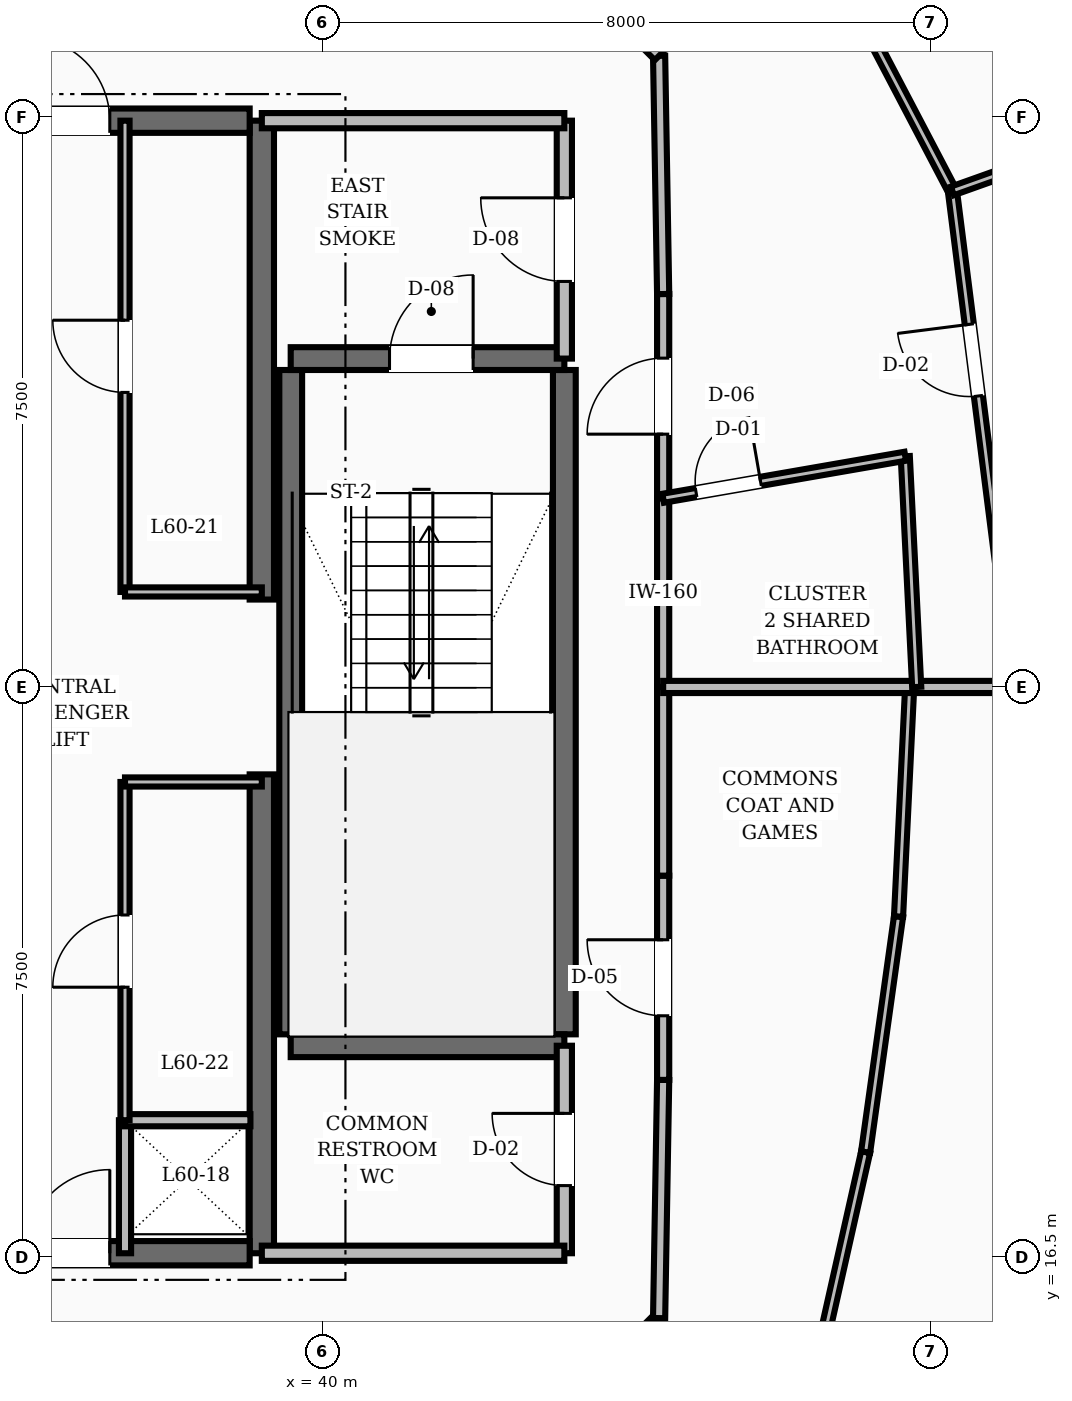
"""IFC4 building model, lengths in metres.
Left out: names, types, materials, properties, quantities, classifications, styles, units other than length and angle.
Written with IfcOpenShell. Run it as: python <this file> out.ifc"""

import sys

from ifc_helpers import new_model, si_unit, direction, frame, frame_2d, origin, place, context, subcontext, project, spatial, rectangle, extrude, element, fill, save


model = new_model("IFC4")
c1 = context("Model", 3, precision=1e-05, world=origin(), true_north=direction((0.0, 1.0)))
c2 = subcontext(c1, "Body", "Model", "MODEL_VIEW")
j1 = project(units=[si_unit("LENGTHUNIT", "METRE"), si_unit("PLANEANGLEUNIT", "RADIAN")], contexts=[c1])
p1 = place(None, origin())
s1 = spatial("IfcSite", under=j1, at=p1, CompositionType="ELEMENT")
p2 = place(p1, origin())
s2 = spatial("IfcBuilding", under=s1, at=p2, CompositionType="ELEMENT")
p3 = place(p2, frame((0.0, 0.0, 232.8)))
s3 = spatial("IfcBuildingStorey", under=s2, at=p3, CompositionType="ELEMENT", Elevation=232.8)
for number, where, z_axis, x_axis in (
    (1, (39.2, 16.55, 0.0), (0.0, 0.0, 1.0), (0.0, 1.0, 0.0)),
    (2, (39.2, 25.15, 0.0), (0.0, 0.0, 1.0), (0.0, 1.0, 0.0)),
):
    element("IfcWall", number, at=place(p3, frame(where, z_axis=z_axis, x_axis=x_axis)), inside=s3, PredefinedType="SHEAR", context=c2, shape_type="SweptSolid", body=[
        extrude(rectangle(XDim=6.3, YDim=0.32, at=frame_2d((3.15, 0.0))), origin(), (0.0, 0.0, 1.0), 3.6),
    ])
p4 = place(p3, frame((35.8, 16.55, 0.0), z_axis=(0.0, 0.0, 1.0), x_axis=(1.0, 0.0, 0.0)))
e3 = element("IfcWall", 3, at=p4, inside=s3, PredefinedType="SHEAR", context=c2, shape_type="SweptSolid", body=[
    extrude(rectangle(XDim=3.24, YDim=0.32, at=frame_2d((1.62, 0.0))), origin(), (0.0, 0.0, 1.0), 3.6),
])
p5 = place(p4, frame((0.3, 0.0, 0.0)))
e4 = element("IfcOpeningElement", 4, at=p5, cuts=e3, PredefinedType="OPENING", context=c2, shape_type="SweptSolid", body=[
    extrude(rectangle(XDim=1.1, YDim=2.1, at=frame_2d((0.55, 1.05))), frame((0.0, 0.17, 0.0), z_axis=(0.0, -1.0, 0.0), x_axis=(1.0, 0.0, 0.0)), (0.0, 0.0, 1.0), 0.34),
])
p6 = place(p3, frame((35.8, 31.45, 0.0), z_axis=(0.0, 0.0, 1.0), x_axis=(1.0, 0.0, 0.0)))
e5 = element("IfcWall", 5, at=p6, inside=s3, PredefinedType="SHEAR", context=c2, shape_type="SweptSolid", body=[
    extrude(rectangle(XDim=3.24, YDim=0.32, at=frame_2d((1.62, 0.0))), origin(), (0.0, 0.0, 1.0), 3.6),
])
p7 = place(p6, frame((0.3, 0.0, 0.0)))
e6 = element("IfcOpeningElement", 6, at=p7, cuts=e5, PredefinedType="OPENING", context=c2, shape_type="SweptSolid", body=[
    extrude(rectangle(XDim=1.1, YDim=2.1, at=frame_2d((0.55, 1.05))), frame((0.0, 0.17, 0.0), z_axis=(0.0, -1.0, 0.0), x_axis=(1.0, 0.0, 0.0)), (0.0, 0.0, 1.0), 0.34),
])
for number, where, z_axis, x_axis in (
    (7, (43.18, 19.43, 0.0), (0.0, 0.0, 1.0), (0.0, 1.0, 0.0)),
    (8, (39.58, 19.43, 0.0), (0.0, 0.0, 1.0), (0.0, 1.0, 0.0)),
):
    element("IfcWall", number, at=place(p3, frame(where, z_axis=z_axis, x_axis=x_axis)), inside=s3, PredefinedType="SHEAR", context=c2, shape_type="SweptSolid", body=[
        extrude(rectangle(XDim=8.74, YDim=0.3, at=frame_2d((4.37, 0.0))), origin(), (0.0, 0.0, 1.0), 3.6),
    ])
p8 = place(p3, frame((39.58, 19.28, 0.0), z_axis=(0.0, 0.0, 1.0), x_axis=(1.0, 0.0, 0.0)))
e9 = element("IfcWall", 9, at=p8, inside=s3, PredefinedType="SHEAR", context=c2, shape_type="SweptSolid", body=[
    extrude(rectangle(XDim=3.6, YDim=0.3, at=frame_2d((1.8, 0.0))), origin(), (0.0, 0.0, 1.0), 3.6),
])
p9 = place(p3, frame((39.58, 28.32, 0.0), z_axis=(0.0, 0.0, 1.0), x_axis=(1.0, 0.0, 0.0)))
e10 = element("IfcWall", 10, at=p9, inside=s3, PredefinedType="SHEAR", context=c2, shape_type="SweptSolid", body=[
    extrude(rectangle(XDim=3.6, YDim=0.3, at=frame_2d((1.8, 0.0))), origin(), (0.0, 0.0, 1.0), 3.6),
])
p10 = place(p9, frame((1.3, 0.0, 0.0)))
e11 = element("IfcOpeningElement", 11, at=p10, cuts=e10, PredefinedType="OPENING", context=c2, shape_type="SweptSolid", body=[
    extrude(rectangle(XDim=1.1, YDim=2.1, at=frame_2d((0.55, 1.05))), frame((0.0, 0.16, 0.0), z_axis=(0.0, -1.0, 0.0), x_axis=(1.0, 0.0, 0.0)), (0.0, 0.0, 1.0), 0.32),
])
p11 = place(p3, frame((43.18, 28.32, 0.0), z_axis=(0.0, 0.0, 1.0), x_axis=(0.0, 1.0, 0.0)))
e12 = element("IfcWall", 12, at=p11, inside=s3, PredefinedType="SOLIDWALL", context=c2, shape_type="SweptSolid", body=[
    extrude(rectangle(XDim=3.13, YDim=0.2, at=frame_2d((1.565, 0.0))), origin(), (0.0, 0.0, 1.0), 2.87),
])
p12 = place(p11, frame((1.015, 0.0, 0.0)))
e13 = element("IfcOpeningElement", 13, at=p12, cuts=e12, PredefinedType="OPENING", context=c2, shape_type="SweptSolid", body=[
    extrude(rectangle(XDim=1.1, YDim=2.1, at=frame_2d((0.55, 1.05))), frame((0.0, 0.11, 0.0), z_axis=(0.0, -1.0, 0.0), x_axis=(1.0, 0.0, 0.0)), (0.0, 0.0, 1.0), 0.22),
])
p13 = place(p3, frame((39.2, 31.45, 0.0), z_axis=(0.0, 0.0, 1.0), x_axis=(1.0, 0.0, 0.0)))
e14 = element("IfcWall", 14, at=p13, inside=s3, PredefinedType="SOLIDWALL", context=c2, shape_type="SweptSolid", body=[
    extrude(rectangle(XDim=3.98, YDim=0.2, at=frame_2d((1.99, 0.0))), origin(), (0.0, 0.0, 1.0), 2.87),
])
p14 = place(p3, frame((43.18, 16.55, 0.0), z_axis=(0.0, 0.0, 1.0), x_axis=(0.0, 1.0, 0.0)))
e15 = element("IfcWall", 15, at=p14, inside=s3, PredefinedType="SOLIDWALL", context=c2, shape_type="SweptSolid", body=[
    extrude(rectangle(XDim=2.73, YDim=0.2, at=frame_2d((1.365, 0.0))), origin(), (0.0, 0.0, 1.0), 2.87),
])
p15 = place(p14, frame((0.89, 0.0, 0.0)))
e16 = element("IfcOpeningElement", 16, at=p15, cuts=e15, PredefinedType="OPENING", context=c2, shape_type="SweptSolid", body=[
    extrude(rectangle(XDim=0.95, YDim=2.1, at=frame_2d((0.475, 1.05))), frame((0.0, 0.11, 0.0), z_axis=(0.0, -1.0, 0.0), x_axis=(1.0, 0.0, 0.0)), (0.0, 0.0, 1.0), 0.22),
])
p16 = place(p3, frame((39.2, 16.55, 0.0), z_axis=(0.0, 0.0, 1.0), x_axis=(1.0, 0.0, 0.0)))
e17 = element("IfcWall", 17, at=p16, inside=s3, PredefinedType="SOLIDWALL", context=c2, shape_type="SweptSolid", body=[
    extrude(rectangle(XDim=3.98, YDim=0.2, at=frame_2d((1.99, 0.0))), origin(), (0.0, 0.0, 1.0), 2.87),
])
p17 = place(p3, frame((37.4, 16.55, 0.0), z_axis=(0.0, 0.0, 1.0), x_axis=(0.0, 1.0, 0.0)))
e18 = element("IfcWall", 18, at=p17, inside=s3, PredefinedType="SOLIDWALL", context=c2, shape_type="SweptSolid", body=[
    extrude(rectangle(XDim=1.75, YDim=0.16, at=frame_2d((0.875, 0.0))), origin(), (0.0, 0.0, 1.0), 2.87),
])
p18 = place(p3, frame((37.4, 18.3, 0.0), z_axis=(0.0, 0.0, 1.0), x_axis=(1.0, 0.0, 0.0)))
e19 = element("IfcWall", 19, at=p18, inside=s3, PredefinedType="SOLIDWALL", context=c2, shape_type="SweptSolid", body=[
    extrude(rectangle(XDim=1.65, YDim=0.16, at=frame_2d((0.825, 0.0))), origin(), (0.0, 0.0, 1.0), 2.87),
])
p19 = place(p3, frame((37.4, 25.25, 0.0), z_axis=(0.0, 0.0, 1.0), x_axis=(0.0, 1.0, 0.0)))
e20 = element("IfcWall", 20, at=p19, inside=s3, PredefinedType="PARTITIONING", context=c2, shape_type="SweptSolid", body=[
    extrude(rectangle(XDim=6.2, YDim=0.12, at=frame_2d((3.1, 0.0))), origin(), (0.0, 0.0, 1.0), 2.87),
])
p20 = place(p19, frame((2.625, 0.0, 0.0)))
e21 = element("IfcOpeningElement", 21, at=p20, cuts=e20, PredefinedType="OPENING", context=c2, shape_type="SweptSolid", body=[
    extrude(rectangle(XDim=0.95, YDim=2.1, at=frame_2d((0.475, 1.05))), frame((0.0, 0.07, 0.0), z_axis=(0.0, -1.0, 0.0), x_axis=(1.0, 0.0, 0.0)), (0.0, 0.0, 1.0), 0.14),
])
p21 = place(p3, frame((37.4, 25.25, 0.0), z_axis=(0.0, 0.0, 1.0), x_axis=(1.0, 0.0, 0.0)))
e22 = element("IfcWall", 22, at=p21, inside=s3, PredefinedType="PARTITIONING", context=c2, shape_type="SweptSolid", body=[
    extrude(rectangle(XDim=1.8, YDim=0.12, at=frame_2d((0.9, 0.0))), origin(), (0.0, 0.0, 1.0), 2.87),
])
p22 = place(p3, frame((37.4, 18.3, 0.0), z_axis=(0.0, 0.0, 1.0), x_axis=(0.0, 1.0, 0.0)))
e23 = element("IfcWall", 23, at=p22, inside=s3, PredefinedType="PARTITIONING", context=c2, shape_type="SweptSolid", body=[
    extrude(rectangle(XDim=4.45, YDim=0.12, at=frame_2d((2.225, 0.0))), origin(), (0.0, 0.0, 1.0), 2.87),
])
p23 = place(p22, frame((1.75, 0.0, 0.0)))
e24 = element("IfcOpeningElement", 24, at=p23, cuts=e23, PredefinedType="OPENING", context=c2, shape_type="SweptSolid", body=[
    extrude(rectangle(XDim=0.95, YDim=2.1, at=frame_2d((0.475, 1.05))), frame((0.0, 0.07, 0.0), z_axis=(0.0, -1.0, 0.0), x_axis=(1.0, 0.0, 0.0)), (0.0, 0.0, 1.0), 0.14),
])
p24 = place(p3, frame((37.4, 22.75, 0.0), z_axis=(0.0, 0.0, 1.0), x_axis=(1.0, 0.0, 0.0)))
e25 = element("IfcWall", 25, at=p24, inside=s3, PredefinedType="PARTITIONING", context=c2, shape_type="SweptSolid", body=[
    extrude(rectangle(XDim=1.8, YDim=0.12, at=frame_2d((0.9, 0.0))), origin(), (0.0, 0.0, 1.0), 2.87),
])
p25 = place(p3, frame((44.48, 24.0, 0.0), z_axis=(0.0, 0.0, 1.0), x_axis=(0.0, 1.0, 0.0)))
e26 = element("IfcWall", 26, at=p25, inside=s3, PredefinedType="SOLIDWALL", context=c2, shape_type="SweptSolid", body=[
    extrude(rectangle(XDim=2.482, YDim=0.16, at=frame_2d((1.241, 0.0))), origin(), (0.0, 0.0, 1.0), 2.87),
])
p26 = place(p3, frame((44.48, 26.482, 0.0), z_axis=(0.0, 0.0, 1.0), x_axis=(0.0, 1.0, 0.0)))
e27 = element("IfcWall", 27, at=p26, inside=s3, PredefinedType="SOLIDWALL", context=c2, shape_type="SweptSolid", body=[
    extrude(rectangle(XDim=2.687, YDim=0.16, at=frame_2d((1.344, 0.0))), origin(), (0.0, 0.0, 1.0), 2.87),
])
p27 = place(p26, frame((0.844, 0.0, 0.0)))
e28 = element("IfcOpeningElement", 28, at=p27, cuts=e27, PredefinedType="OPENING", context=c2, shape_type="SweptSolid", body=[
    extrude(rectangle(XDim=1.0, YDim=2.1, at=frame_2d((0.5, 1.05))), frame((0.0, 0.09, 0.0), z_axis=(0.0, -1.0, 0.0), x_axis=(1.0, 0.0, 0.0)), (0.0, 0.0, 1.0), 0.18),
])
p28 = place(p3, frame((44.48, 29.169, 0.0), z_axis=(0.0, 0.0, 1.0), x_axis=(-0.016981035134, 0.999855811828, 0.0)))
e29 = element("IfcWall", 29, at=p28, inside=s3, PredefinedType="SOLIDWALL", context=c2, shape_type="SweptSolid", body=[
    extrude(rectangle(XDim=3.134, YDim=0.16, at=frame_2d((1.567, 0.0))), origin(), (0.0, 0.0, 1.0), 2.87),
])
for number, where, z_axis, x_axis in (
    (30, (44.427, 32.303, 0.0), (0.0, 0.0, 1.0), (-0.707, 0.707, 0.0)),
    (31, (42.365, 13.635, 0.0), (0.0, 0.0, 1.0), (0.707, 0.707, 0.0)),
):
    element("IfcWall", number, at=place(p3, frame(where, z_axis=z_axis, x_axis=x_axis)), inside=s3, PredefinedType="SOLIDWALL", context=c2, shape_type="SweptSolid", body=[
        extrude(rectangle(XDim=2.916, YDim=0.16, at=frame_2d((1.458, 0.0))), origin(), (0.0, 0.0, 1.0), 2.87),
    ])
p29 = place(p3, frame((44.427, 15.697, 0.0), z_axis=(0.0, 0.0, 1.0), x_axis=(0.016981035134, 0.999855811828, 0.0)))
e32 = element("IfcWall", 32, at=p29, inside=s3, PredefinedType="SOLIDWALL", context=c2, shape_type="SweptSolid", body=[
    extrude(rectangle(XDim=3.134, YDim=0.16, at=frame_2d((1.567, 0.0))), origin(), (0.0, 0.0, 1.0), 2.87),
])
p30 = place(p3, frame((44.48, 18.831, 0.0), z_axis=(0.0, 0.0, 1.0), x_axis=(0.0, 1.0, 0.0)))
e33 = element("IfcWall", 33, at=p30, inside=s3, PredefinedType="SOLIDWALL", context=c2, shape_type="SweptSolid", body=[
    extrude(rectangle(XDim=2.687, YDim=0.16, at=frame_2d((1.344, 0.0))), origin(), (0.0, 0.0, 1.0), 2.87),
])
p31 = place(p30, frame((0.844, 0.0, 0.0)))
e34 = element("IfcOpeningElement", 34, at=p31, cuts=e33, PredefinedType="OPENING", context=c2, shape_type="SweptSolid", body=[
    extrude(rectangle(XDim=1.0, YDim=2.1, at=frame_2d((0.5, 1.05))), frame((0.0, 0.09, 0.0), z_axis=(0.0, -1.0, 0.0), x_axis=(1.0, 0.0, 0.0)), (0.0, 0.0, 1.0), 0.18),
])
p32 = place(p3, frame((44.48, 21.518, 0.0), z_axis=(0.0, 0.0, 1.0), x_axis=(0.0, 1.0, 0.0)))
e35 = element("IfcWall", 35, at=p32, inside=s3, PredefinedType="SOLIDWALL", context=c2, shape_type="SweptSolid", body=[
    extrude(rectangle(XDim=2.482, YDim=0.16, at=frame_2d((1.241, 0.0))), origin(), (0.0, 0.0, 1.0), 2.87),
])
p33 = place(p3, frame((46.406, 14.598, 0.0), z_axis=(0.0, 0.0, 1.0), x_axis=(0.219303315939, 0.975656730422, 0.0)))
e36 = element("IfcWall", 36, at=p33, inside=s3, PredefinedType="PARTITIONING", context=c2, shape_type="SweptSolid", body=[
    extrude(rectangle(XDim=3.365, YDim=0.12, at=frame_2d((1.683, 0.0))), origin(), (0.0, 0.0, 1.0), 2.87),
])
p34 = place(p3, frame((47.144, 17.881, 0.0), z_axis=(0.0, 0.0, 1.0), x_axis=(0.138416734292, 0.990374074614, 0.0)))
e37 = element("IfcWall", 37, at=p34, inside=s3, PredefinedType="PARTITIONING", context=c2, shape_type="SweptSolid", body=[
    extrude(rectangle(XDim=3.129, YDim=0.12, at=frame_2d((1.564, 0.0))), origin(), (0.0, 0.0, 1.0), 2.87),
])
p35 = place(p3, frame((47.577, 20.98, 0.0), z_axis=(0.0, 0.0, 1.0), x_axis=(0.048366932207, 0.998829635057, 0.0)))
e38 = element("IfcWall", 38, at=p35, inside=s3, PredefinedType="PARTITIONING", context=c2, shape_type="SweptSolid", body=[
    extrude(rectangle(XDim=3.023, YDim=0.12, at=frame_2d((1.512, 0.0))), origin(), (0.0, 0.0, 1.0), 2.87),
])
p36 = place(p3, frame((44.48, 24.0, 0.0), z_axis=(0.0, 0.0, 1.0), x_axis=(1.0, 0.0, 0.0)))
e39 = element("IfcWall", 39, at=p36, inside=s3, PredefinedType="SOLIDWALL", context=c2, shape_type="SweptSolid", body=[
    extrude(rectangle(XDim=9.216, YDim=0.16, at=frame_2d((4.608, 0.0))), origin(), (0.0, 0.0, 1.0), 2.87),
])
p37 = place(p3, frame((47.816, 24.0, 0.0), z_axis=(0.0, 0.0, 1.0), x_axis=(-0.049484864646, 0.998774873618, 0.0)))
e40 = element("IfcWall", 40, at=p37, inside=s3, PredefinedType="PARTITIONING", context=c2, shape_type="SweptSolid", body=[
    extrude(rectangle(XDim=3.039, YDim=0.12, at=frame_2d((1.52, 0.0))), origin(), (0.0, 0.0, 1.0), 2.87),
])
p38 = place(p3, frame((44.48, 26.482, 0.0), z_axis=(0.0, 0.0, 1.0), x_axis=(0.985263255419, 0.171044782212, 0.0)))
e41 = element("IfcWall", 41, at=p38, inside=s3, PredefinedType="PARTITIONING", context=c2, shape_type="SweptSolid", body=[
    extrude(rectangle(XDim=3.233, YDim=0.12, at=frame_2d((1.616, 0.0))), origin(), (0.0, 0.0, 1.0), 2.87),
])
p39 = place(p38, frame((0.44, 0.0, 0.0)))
e42 = element("IfcOpeningElement", 42, at=p39, cuts=e41, PredefinedType="OPENING", context=c2, shape_type="SweptSolid", body=[
    extrude(rectangle(XDim=0.86, YDim=2.1, at=frame_2d((0.43, 1.05))), frame((0.0, 0.07, 0.0), z_axis=(0.0, -1.0, 0.0), x_axis=(1.0, 0.0, 0.0)), (0.0, 0.0, 1.0), 0.14),
])
p40 = place(p3, frame((49.113, 24.0, 0.0), z_axis=(0.0, 0.0, 1.0), x_axis=(-0.125779473563, 0.992058226129, 0.0)))
e43 = element("IfcWall", 43, at=p40, inside=s3, PredefinedType="PARTITIONING", context=c2, shape_type="SweptSolid", body=[
    extrude(rectangle(XDim=6.578, YDim=0.12, at=frame_2d((3.289, 0.0))), origin(), (0.0, 0.0, 1.0), 2.87),
])
p41 = place(p40, frame((3.859, 0.0, 0.0)))
e44 = element("IfcOpeningElement", 44, at=p41, cuts=e43, PredefinedType="OPENING", context=c2, shape_type="SweptSolid", body=[
    extrude(rectangle(XDim=0.95, YDim=2.1, at=frame_2d((0.475, 1.05))), frame((0.0, 0.07, 0.0), z_axis=(0.0, -1.0, 0.0), x_axis=(1.0, 0.0, 0.0)), (0.0, 0.0, 1.0), 0.14),
])
p42 = place(p3, frame((48.285, 30.526, 0.0), z_axis=(0.0, 0.0, 1.0), x_axis=(-0.464213686546, 0.885723237373, 0.0)))
e45 = element("IfcWall", 45, at=p42, inside=s3, PredefinedType="PARTITIONING", context=c2, shape_type="SweptSolid", body=[
    extrude(rectangle(XDim=6.929, YDim=0.12, at=frame_2d((3.464, 0.0))), origin(), (0.0, 0.0, 1.0), 2.87),
])
p43 = place(p42, frame((2.99, 0.0, 0.0)))
e46 = element("IfcOpeningElement", 46, at=p43, cuts=e45, PredefinedType="OPENING", context=c2, shape_type="SweptSolid", body=[
    extrude(rectangle(XDim=0.95, YDim=2.1, at=frame_2d((0.475, 1.05))), frame((0.0, 0.07, 0.0), z_axis=(0.0, -1.0, 0.0), x_axis=(1.0, 0.0, 0.0)), (0.0, 0.0, 1.0), 0.14),
])
p44 = place(p3, frame((48.285, 30.526, 0.0), z_axis=(0.0, 0.0, 1.0), x_axis=(0.941925899745, 0.335820784629, 0.0)))
e47 = element("IfcWall", 47, at=p44, inside=s3, PredefinedType="PARTITIONING", context=c2, shape_type="SweptSolid", body=[
    extrude(rectangle(XDim=3.99, YDim=0.12, at=frame_2d((1.995, 0.0))), origin(), (0.0, 0.0, 1.0), 2.87),
])
p45 = place(p10, origin())
e48 = element("IfcDoor", 48, at=p45, inside=s3, OperationType="SINGLE_SWING_RIGHT", PredefinedType="DOOR", context=c2, shape_type="SweptSolid", body=[
    extrude(rectangle(XDim=1.1, YDim=2.1, at=frame_2d((0.55, 1.05))), frame((0.0, 0.025, 0.0), z_axis=(0.0, -1.0, 0.0), x_axis=(1.0, 0.0, 0.0)), (0.0, 0.0, 1.0), 0.05),
])
fill(e11, e48)
p46 = place(p12, origin())
e49 = element("IfcDoor", 49, at=p46, inside=s3, OperationType="SINGLE_SWING_RIGHT", PredefinedType="DOOR", context=c2, shape_type="SweptSolid", body=[
    extrude(rectangle(XDim=1.1, YDim=2.1, at=frame_2d((0.55, 1.05))), frame((0.0, 0.025, 0.0), z_axis=(0.0, -1.0, 0.0), x_axis=(1.0, 0.0, 0.0)), (0.0, 0.0, 1.0), 0.05),
])
fill(e13, e49)
p47 = place(p15, origin())
e50 = element("IfcDoor", 50, at=p47, inside=s3, OperationType="SINGLE_SWING_RIGHT", PredefinedType="DOOR", context=c2, shape_type="SweptSolid", body=[
    extrude(rectangle(XDim=0.95, YDim=2.1, at=frame_2d((0.475, 1.05))), frame((0.0, 0.025, 0.0), z_axis=(0.0, -1.0, 0.0), x_axis=(1.0, 0.0, 0.0)), (0.0, 0.0, 1.0), 0.05),
])
fill(e16, e50)
p48 = place(p7, origin())
e51 = element("IfcDoor", 51, at=p48, inside=s3, OperationType="SINGLE_SWING_LEFT", PredefinedType="DOOR", context=c2, shape_type="SweptSolid", body=[
    extrude(rectangle(XDim=1.1, YDim=2.1, at=frame_2d((0.55, 1.05))), frame((0.0, 0.025, 0.0), z_axis=(0.0, -1.0, 0.0), x_axis=(1.0, 0.0, 0.0)), (0.0, 0.0, 1.0), 0.05),
])
fill(e6, e51)
p49 = place(p5, origin())
e52 = element("IfcDoor", 52, at=p49, inside=s3, OperationType="SINGLE_SWING_RIGHT", PredefinedType="DOOR", context=c2, shape_type="SweptSolid", body=[
    extrude(rectangle(XDim=1.1, YDim=2.1, at=frame_2d((0.55, 1.05))), frame((0.0, 0.025, 0.0), z_axis=(0.0, -1.0, 0.0), x_axis=(1.0, 0.0, 0.0)), (0.0, 0.0, 1.0), 0.05),
])
fill(e4, e52)
p50 = place(p20, origin())
e53 = element("IfcDoor", 53, at=p50, inside=s3, OperationType="SINGLE_SWING_RIGHT", PredefinedType="DOOR", context=c2, shape_type="SweptSolid", body=[
    extrude(rectangle(XDim=0.95, YDim=2.1, at=frame_2d((0.475, 1.05))), frame((0.0, 0.025, 0.0), z_axis=(0.0, -1.0, 0.0), x_axis=(1.0, 0.0, 0.0)), (0.0, 0.0, 1.0), 0.05),
])
fill(e21, e53)
p51 = place(p23, origin())
e54 = element("IfcDoor", 54, at=p51, inside=s3, OperationType="SINGLE_SWING_LEFT", PredefinedType="DOOR", context=c2, shape_type="SweptSolid", body=[
    extrude(rectangle(XDim=0.95, YDim=2.1, at=frame_2d((0.475, 1.05))), frame((0.0, 0.025, 0.0), z_axis=(0.0, -1.0, 0.0), x_axis=(1.0, 0.0, 0.0)), (0.0, 0.0, 1.0), 0.05),
])
fill(e24, e54)
p52 = place(p31, origin())
e55 = element("IfcDoor", 55, at=p52, inside=s3, OperationType="SINGLE_SWING_RIGHT", PredefinedType="DOOR", context=c2, shape_type="SweptSolid", body=[
    extrude(rectangle(XDim=1.0, YDim=2.1, at=frame_2d((0.5, 1.05))), frame((0.0, 0.025, 0.0), z_axis=(0.0, -1.0, 0.0), x_axis=(1.0, 0.0, 0.0)), (0.0, 0.0, 1.0), 0.05),
])
fill(e34, e55)
p53 = place(p39, origin())
e56 = element("IfcDoor", 56, at=p53, inside=s3, OperationType="SINGLE_SWING_RIGHT", PredefinedType="DOOR", context=c2, shape_type="SweptSolid", body=[
    extrude(rectangle(XDim=0.86, YDim=2.1, at=frame_2d((0.43, 1.05))), frame((0.0, 0.025, 0.0), z_axis=(0.0, -1.0, 0.0), x_axis=(1.0, 0.0, 0.0)), (0.0, 0.0, 1.0), 0.05),
])
fill(e42, e56)
p54 = place(p27, origin())
e57 = element("IfcDoor", 57, at=p54, inside=s3, OperationType="SINGLE_SWING_LEFT", PredefinedType="DOOR", context=c2, shape_type="SweptSolid", body=[
    extrude(rectangle(XDim=1.0, YDim=2.1, at=frame_2d((0.5, 1.05))), frame((0.0, 0.025, 0.0), z_axis=(0.0, -1.0, 0.0), x_axis=(1.0, 0.0, 0.0)), (0.0, 0.0, 1.0), 0.05),
])
fill(e28, e57)
p55 = place(p41, origin())
e58 = element("IfcDoor", 58, at=p55, inside=s3, OperationType="SINGLE_SWING_RIGHT", PredefinedType="DOOR", context=c2, shape_type="SweptSolid", body=[
    extrude(rectangle(XDim=0.95, YDim=2.1, at=frame_2d((0.475, 1.05))), frame((0.0, 0.025, 0.0), z_axis=(0.0, -1.0, 0.0), x_axis=(1.0, 0.0, 0.0)), (0.0, 0.0, 1.0), 0.05),
])
fill(e44, e58)
save(model, sys.argv[1])
